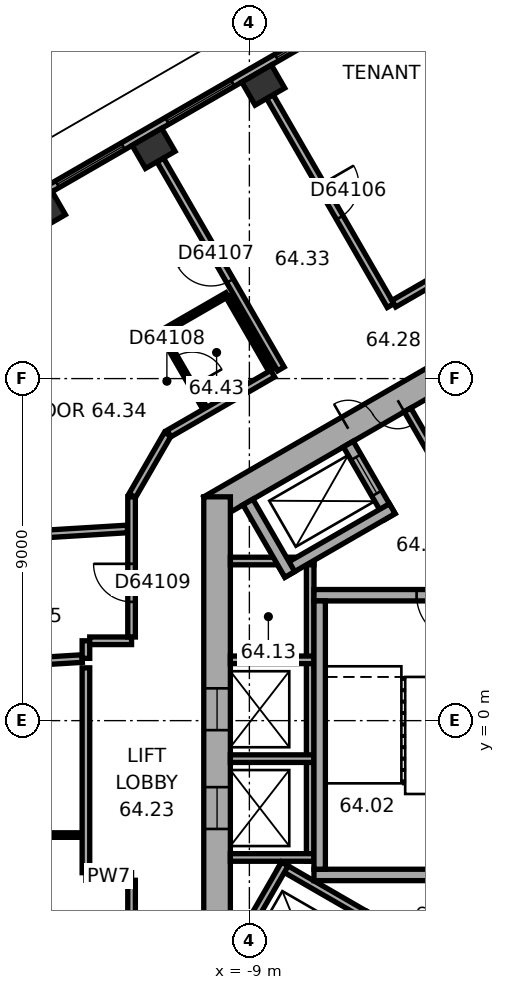
"""IFC4 building model, lengths in metres.
Left out: names, types, materials, properties, quantities, classifications, styles, units other than length and angle.
Written with IfcOpenShell. Run it as: python <this file> out.ifc"""

import sys

from ifc_helpers import new_model, si_unit, direction, frame, frame_2d, origin, origin_2d, place, context, subcontext, project, spatial, rectangle, extrude, element, fill, save


model = new_model("IFC4")
c1 = context("Model", 3, precision=1e-05, world=origin(), true_north=direction((0.0, 1.0)))
c2 = subcontext(c1, "Body", "Model", "MODEL_VIEW")
j1 = project(units=[si_unit("LENGTHUNIT", "METRE"), si_unit("PLANEANGLEUNIT", "RADIAN")], contexts=[c1])
p1 = place(None, origin())
s1 = spatial("IfcSite", under=j1, at=p1, CompositionType="ELEMENT")
p2 = place(p1, origin())
s2 = spatial("IfcBuilding", under=s1, at=p2, CompositionType="ELEMENT")
p3 = place(p2, frame((0.0, 0.0, 259.8)))
s3 = spatial("IfcBuildingStorey", under=s2, at=p3, CompositionType="ELEMENT", Elevation=259.8)
for number, where, z_axis, x_axis in (
    (1, (-8.635, 16.723, 0.0), (0.0, 0.0, 1.0), (-0.866, -0.5, 0.0)),
    (2, (-11.52, 15.057, 0.0), (0.0, 0.0, 1.0), (-0.866, -0.5, 0.0)),
    (3, (-14.406, 13.391, 0.0), (0.0, 0.0, 1.0), (-0.866, -0.5, 0.0)),
):
    element("IfcColumn", number, at=place(p3, frame(where, z_axis=z_axis, x_axis=x_axis)), inside=s3, PredefinedType="COLUMN", context=c2, shape_type="SweptSolid", body=[
        extrude(rectangle(XDim=0.9, YDim=0.7, at=origin_2d()), origin(), (0.0, 0.0, 1.0), 3.7),
    ])
p4 = place(p3, frame((0.175, 11.475, 0.0), z_axis=(0.0, 0.0, 1.0), x_axis=(-0.866026453023, -0.499998182661, 0.0)))
e4 = element("IfcWall", 4, at=p4, inside=s3, PredefinedType="SHEAR", context=c2, shape_type="SweptSolid", body=[
    extrude(rectangle(XDim=11.778, YDim=0.7, at=frame_2d((5.889, 0.0))), origin(), (0.0, 0.0, 1.0), 3.7),
])
p5 = place(p4, frame((6.089, 0.0, 0.0)))
e5 = element("IfcOpeningElement", 5, at=p5, cuts=e4, PredefinedType="OPENING", context=c2, shape_type="SweptSolid", body=[
    extrude(rectangle(XDim=1.5, YDim=2.1, at=frame_2d((0.75, 1.05))), frame((0.0, 0.36, 0.0), z_axis=(0.0, -1.0, 0.0), x_axis=(1.0, 0.0, 0.0)), (0.0, 0.0, 1.0), 0.72),
])
p6 = place(p4, frame((2.939, 0.0, 0.0)))
e6 = element("IfcOpeningElement", 6, at=p6, cuts=e4, PredefinedType="OPENING", context=c2, shape_type="SweptSolid", body=[
    extrude(rectangle(XDim=0.9, YDim=2.1, at=frame_2d((0.45, 1.05))), frame((0.0, 0.36, 0.0), z_axis=(0.0, -1.0, 0.0), x_axis=(1.0, 0.0, 0.0)), (0.0, 0.0, 1.0), 0.72),
])
p7 = place(p3, frame((-9.85, 5.889, 0.0), z_axis=(0.0, 0.0, 1.0), x_axis=(0.0, -1.0, 0.0)))
e7 = element("IfcWall", 7, at=p7, inside=s3, PredefinedType="SHEAR", context=c2, shape_type="SweptSolid", body=[
    extrude(rectangle(XDim=11.778, YDim=0.7, at=frame_2d((5.889, 0.0))), origin(), (0.0, 0.0, 1.0), 3.7),
])
p8 = place(p7, frame((5.039, 0.0, 0.0)))
e8 = element("IfcOpeningElement", 8, at=p8, cuts=e7, PredefinedType="OPENING", context=c2, shape_type="SweptSolid", body=[
    extrude(rectangle(XDim=1.1, YDim=2.1, at=frame_2d((0.55, 1.05))), frame((0.0, 0.36, 0.0), z_axis=(0.0, -1.0, 0.0), x_axis=(1.0, 0.0, 0.0)), (0.0, 0.0, 1.0), 0.72),
])
p9 = place(p7, frame((7.639, 0.0, 0.0)))
e9 = element("IfcOpeningElement", 9, at=p9, cuts=e7, PredefinedType="OPENING", context=c2, shape_type="SweptSolid", body=[
    extrude(rectangle(XDim=1.1, YDim=2.1, at=frame_2d((0.55, 1.05))), frame((0.0, 0.36, 0.0), z_axis=(0.0, -1.0, 0.0), x_axis=(1.0, 0.0, 0.0)), (0.0, 0.0, 1.0), 0.72),
])
p10 = place(p3, frame((-2.624, 20.713, 0.0), z_axis=(0.0, 0.0, 1.0), x_axis=(-0.866026460444, -0.499998169808, 0.0)))
e10 = element("IfcWall", 10, at=p10, inside=s3, PredefinedType="STANDARD", context=c2, shape_type="SweptSolid", body=[
    extrude(rectangle(XDim=17.731, YDim=0.2, at=frame_2d((8.866, 0.0))), origin(), (0.0, 0.0, 1.0), 3.7),
])
p11 = place(p10, frame((1.203, 0.0, 0.9)))
e11 = element("IfcOpeningElement", 11, at=p11, cuts=e10, PredefinedType="OPENING", context=c2, shape_type="SweptSolid", body=[
    extrude(rectangle(XDim=2.0, YDim=2.0, at=frame_2d((1.0, 1.0))), frame((0.0, 0.11, 0.0), z_axis=(0.0, -1.0, 0.0), x_axis=(1.0, 0.0, 0.0)), (0.0, 0.0, 1.0), 0.22),
])
p12 = place(p10, frame((4.535, 0.0, 0.9)))
e12 = element("IfcOpeningElement", 12, at=p12, cuts=e10, PredefinedType="OPENING", context=c2, shape_type="SweptSolid", body=[
    extrude(rectangle(XDim=2.0, YDim=2.0, at=frame_2d((1.0, 1.0))), frame((0.0, 0.11, 0.0), z_axis=(0.0, -1.0, 0.0), x_axis=(1.0, 0.0, 0.0)), (0.0, 0.0, 1.0), 0.22),
])
p13 = place(p10, frame((7.867, 0.0, 0.9)))
e13 = element("IfcOpeningElement", 13, at=p13, cuts=e10, PredefinedType="OPENING", context=c2, shape_type="SweptSolid", body=[
    extrude(rectangle(XDim=2.0, YDim=2.0, at=frame_2d((1.0, 1.0))), frame((0.0, 0.11, 0.0), z_axis=(0.0, -1.0, 0.0), x_axis=(1.0, 0.0, 0.0)), (0.0, 0.0, 1.0), 0.22),
])
p14 = place(p10, frame((11.198, 0.0, 0.9)))
e14 = element("IfcOpeningElement", 14, at=p14, cuts=e10, PredefinedType="OPENING", context=c2, shape_type="SweptSolid", body=[
    extrude(rectangle(XDim=2.0, YDim=2.0, at=frame_2d((1.0, 1.0))), frame((0.0, 0.11, 0.0), z_axis=(0.0, -1.0, 0.0), x_axis=(1.0, 0.0, 0.0)), (0.0, 0.0, 1.0), 0.22),
])
p15 = place(p10, frame((14.53, 0.0, 0.9)))
e15 = element("IfcOpeningElement", 15, at=p15, cuts=e10, PredefinedType="OPENING", context=c2, shape_type="SweptSolid", body=[
    extrude(rectangle(XDim=2.0, YDim=2.0, at=frame_2d((1.0, 1.0))), frame((0.0, 0.11, 0.0), z_axis=(0.0, -1.0, 0.0), x_axis=(1.0, 0.0, 0.0)), (0.0, 0.0, 1.0), 0.22),
])
p16 = place(p3, frame((-3.737, 6.272, 0.0), z_axis=(0.0, 0.0, 1.0), x_axis=(-0.50002983664, 0.866008176907, 0.0)))
e16 = element("IfcWall", 16, at=p16, inside=s3, PredefinedType="PARTITIONING", context=c2, shape_type="SweptSolid", body=[
    extrude(rectangle(XDim=2.2, YDim=0.2, at=frame_2d((1.1, 0.0))), origin(), (0.0, 0.0, 1.0), 3.42),
])
p17 = place(p3, frame((-7.4, 4.3, 0.0), z_axis=(0.0, 0.0, 1.0), x_axis=(0.0, -1.0, 0.0)))
e17 = element("IfcWall", 17, at=p17, inside=s3, PredefinedType="PARTITIONING", context=c2, shape_type="SweptSolid", body=[
    extrude(rectangle(XDim=8.0, YDim=0.2, at=frame_2d((4.0, 0.0))), origin(), (0.0, 0.0, 1.0), 3.42),
])
for number, where, z_axis, x_axis in (
    (18, (-7.3, 4.2, 0.0), (0.0, 0.0, 1.0), (-1.0, 0.0, 0.0)),
    (19, (-7.3, 1.6, 0.0), (0.0, 0.0, 1.0), (-1.0, 0.0, 0.0)),
    (20, (-7.3, -1.0, 0.0), (0.0, 0.0, 1.0), (-1.0, 0.0, 0.0)),
    (21, (-7.3, -3.6, 0.0), (0.0, 0.0, 1.0), (-1.0, 0.0, 0.0)),
):
    element("IfcWall", number, at=place(p3, frame(where, z_axis=z_axis, x_axis=x_axis)), inside=s3, PredefinedType="PARTITIONING", context=c2, shape_type="SweptSolid", body=[
        extrude(rectangle(XDim=2.2, YDim=0.2, at=frame_2d((1.1, 0.0))), origin(), (0.0, 0.0, 1.0), 3.42),
    ])
p18 = place(p3, frame((-8.203, -3.809, 0.0), z_axis=(0.0, 0.0, 1.0), x_axis=(0.866028230842, -0.499995103361, 0.0)))
e22 = element("IfcWall", 22, at=p18, inside=s3, PredefinedType="PARTITIONING", context=c2, shape_type="SweptSolid", body=[
    extrude(rectangle(XDim=5.4, YDim=0.2, at=frame_2d((2.7, 0.0))), origin(), (0.0, 0.0, 1.0), 3.42),
])
p19 = place(p3, frame((-8.067, -3.772, 0.0), z_axis=(0.0, 0.0, 1.0), x_axis=(-0.50002983664, -0.866008176907, 0.0)))
e23 = element("IfcWall", 23, at=p19, inside=s3, PredefinedType="PARTITIONING", context=c2, shape_type="SweptSolid", body=[
    extrude(rectangle(XDim=2.2, YDim=0.2, at=frame_2d((1.1, 0.0))), origin(), (0.0, 0.0, 1.0), 3.42),
])
p20 = place(p3, frame((-2.6, 3.3, 0.0), z_axis=(0.0, 0.0, 1.0), x_axis=(-1.0, 0.0, 0.0)))
e24 = element("IfcWall", 24, at=p20, inside=s3, PredefinedType="SHEAR", context=c2, shape_type="SweptSolid", body=[
    extrude(rectangle(XDim=4.7, YDim=0.3, at=frame_2d((2.35, 0.0))), origin(), (0.0, 0.0, 1.0), 3.42),
])
p21 = place(p20, frame((0.8, 0.0, 0.0)))
e25 = element("IfcOpeningElement", 25, at=p21, cuts=e24, PredefinedType="OPENING", context=c2, shape_type="SweptSolid", body=[
    extrude(rectangle(XDim=1.2, YDim=2.1, at=frame_2d((0.6, 1.05))), frame((0.0, 0.16, 0.0), z_axis=(0.0, -1.0, 0.0), x_axis=(1.0, 0.0, 0.0)), (0.0, 0.0, 1.0), 0.32),
])
p22 = place(p3, frame((-2.6, -4.06, 0.0), z_axis=(0.0, 0.0, 1.0), x_axis=(-1.0, 0.0, 0.0)))
e26 = element("IfcWall", 26, at=p22, inside=s3, PredefinedType="SHEAR", context=c2, shape_type="SweptSolid", body=[
    extrude(rectangle(XDim=4.7, YDim=0.3, at=frame_2d((2.35, 0.0))), origin(), (0.0, 0.0, 1.0), 3.42),
])
p23 = place(p3, frame((-7.15, 3.15, 0.0), z_axis=(0.0, 0.0, 1.0), x_axis=(0.0, -1.0, 0.0)))
e27 = element("IfcWall", 27, at=p23, inside=s3, PredefinedType="SHEAR", context=c2, shape_type="SweptSolid", body=[
    extrude(rectangle(XDim=7.06, YDim=0.3, at=frame_2d((3.53, 0.0))), origin(), (0.0, 0.0, 1.0), 3.42),
])
p24 = place(p3, frame((-5.295, 5.372, 0.0), z_axis=(0.0, 0.0, 1.0), x_axis=(-0.500077893725, 0.86598042715, 0.0)))
e28 = element("IfcWall", 28, at=p24, inside=s3, PredefinedType="SHEAR", context=c2, shape_type="SweptSolid", body=[
    extrude(rectangle(XDim=2.2, YDim=0.3, at=frame_2d((1.1, 0.0))), origin(), (0.0, 0.0, 1.0), 3.42),
])
p25 = place(p24, frame((0.7, 0.0, 0.0)))
e29 = element("IfcOpeningElement", 29, at=p25, cuts=e28, PredefinedType="OPENING", context=c2, shape_type="SweptSolid", body=[
    extrude(rectangle(XDim=1.1, YDim=2.1, at=frame_2d((0.55, 1.05))), frame((0.0, 0.16, 0.0), z_axis=(0.0, -1.0, 0.0), x_axis=(1.0, 0.0, 0.0)), (0.0, 0.0, 1.0), 0.32),
])
p26 = place(p3, frame((-5.24, 5.577, 0.0), z_axis=(0.0, 0.0, 1.0), x_axis=(-0.866014461049, -0.500018952895, 0.0)))
e30 = element("IfcWall", 30, at=p26, inside=s3, PredefinedType="SHEAR", context=c2, shape_type="SweptSolid", body=[
    extrude(rectangle(XDim=3.35, YDim=0.3, at=frame_2d((1.675, 0.0))), origin(), (0.0, 0.0, 1.0), 3.42),
])
p27 = place(p3, frame((-7.937, 3.847, 0.0), z_axis=(0.0, 0.0, 1.0), x_axis=(-0.50002983664, 0.866008176907, 0.0)))
e31 = element("IfcWall", 31, at=p27, inside=s3, PredefinedType="SHEAR", context=c2, shape_type="SweptSolid", body=[
    extrude(rectangle(XDim=2.2, YDim=0.3, at=frame_2d((1.1, 0.0))), origin(), (0.0, 0.0, 1.0), 3.42),
])
p28 = place(p3, frame((-18.768, 4.643, 0.0), z_axis=(0.0, 0.0, 1.0), x_axis=(0.99813496285, 0.0610458511, 0.0)))
e32 = element("IfcWall", 32, at=p28, inside=s3, PredefinedType="PARTITIONING", context=c2, shape_type="SweptSolid", body=[
    extrude(rectangle(XDim=6.571, YDim=0.2, at=frame_2d((3.285, 0.0))), origin(), (0.0, 0.0, 1.0), 3.42),
])
p29 = place(p3, frame((-18.565, 1.317, 0.0), z_axis=(0.0, 0.0, 1.0), x_axis=(0.998136844425, 0.061015078472, 0.0)))
e33 = element("IfcWall", 33, at=p29, inside=s3, PredefinedType="PARTITIONING", context=c2, shape_type="SweptSolid", body=[
    extrude(rectangle(XDim=5.174, YDim=0.2, at=frame_2d((2.587, 0.0))), origin(), (0.0, 0.0, 1.0), 2.87),
])
p30 = place(p3, frame((-13.401, -3.011, 0.0), z_axis=(0.0, 0.0, 1.0), x_axis=(-1.0, 0.0, 0.0)))
e34 = element("IfcWall", 34, at=p30, inside=s3, PredefinedType="PARTITIONING", context=c2, shape_type="SweptSolid", body=[
    extrude(rectangle(XDim=3.84, YDim=0.12, at=frame_2d((1.92, 0.0))), origin(), (0.0, 0.0, 1.0), 3.42),
])
p31 = place(p3, frame((-13.301, -4.101, 0.0), z_axis=(0.0, 0.0, 1.0), x_axis=(1.0, 0.0, 0.0)))
e35 = element("IfcWall", 35, at=p31, inside=s3, PredefinedType="PARTITIONING", context=c2, shape_type="SweptSolid", body=[
    extrude(rectangle(XDim=1.201, YDim=0.2, at=frame_2d((0.601, 0.0))), origin(), (0.0, 0.0, 1.0), 3.42),
])
p32 = place(p3, frame((-13.301, 1.389, 0.0), z_axis=(0.0, 0.0, 1.0), x_axis=(0.0, -1.0, 0.0)))
e36 = element("IfcWall", 36, at=p32, inside=s3, PredefinedType="PARTITIONING", context=c2, shape_type="SweptSolid", body=[
    extrude(rectangle(XDim=5.39, YDim=0.2, at=frame_2d((2.695, 0.0))), origin(), (0.0, 0.0, 1.0), 3.42),
])
p33 = place(p3, frame((-13.301, 2.101, 0.0), z_axis=(0.0, 0.0, 1.0), x_axis=(0.0, -1.0, 0.0)))
e37 = element("IfcWall", 37, at=p33, inside=s3, PredefinedType="PARTITIONING", context=c2, shape_type="SweptSolid", body=[
    extrude(rectangle(XDim=0.462, YDim=0.2, at=frame_2d((0.231, 0.0))), origin(), (0.0, 0.0, 1.0), 3.42),
])
p34 = place(p3, frame((-12.1, -4.201, 0.0), z_axis=(0.0, 0.0, 1.0), x_axis=(0.0, -1.0, 0.0)))
e38 = element("IfcWall", 38, at=p34, inside=s3, PredefinedType="PARTITIONING", context=c2, shape_type="SweptSolid", body=[
    extrude(rectangle(XDim=1.648, YDim=0.2, at=frame_2d((0.824, 0.0))), origin(), (0.0, 0.0, 1.0), 3.42),
])
p35 = place(p3, frame((-12.1, 2.101, 0.0), z_axis=(0.0, 0.0, 1.0), x_axis=(-1.0, 0.0, 0.0)))
e39 = element("IfcWall", 39, at=p35, inside=s3, PredefinedType="PARTITIONING", context=c2, shape_type="SweptSolid", body=[
    extrude(rectangle(XDim=1.101, YDim=0.2, at=frame_2d((0.55, 0.0))), origin(), (0.0, 0.0, 1.0), 3.42),
])
p36 = place(p3, frame((-12.1, 5.889, 0.0), z_axis=(0.0, 0.0, 1.0), x_axis=(0.0, -1.0, 0.0)))
e40 = element("IfcWall", 40, at=p36, inside=s3, PredefinedType="PARTITIONING", context=c2, shape_type="SweptSolid", body=[
    extrude(rectangle(XDim=3.688, YDim=0.2, at=frame_2d((1.844, 0.0))), origin(), (0.0, 0.0, 1.0), 3.42),
])
p37 = place(p36, frame((1.763, 0.0, 0.0)))
e41 = element("IfcOpeningElement", 41, at=p37, cuts=e40, PredefinedType="OPENING", context=c2, shape_type="SweptSolid", body=[
    extrude(rectangle(XDim=1.0, YDim=2.1, at=frame_2d((0.5, 1.05))), frame((0.0, 0.11, 0.0), z_axis=(0.0, -1.0, 0.0), x_axis=(1.0, 0.0, 0.0)), (0.0, 0.0, 1.0), 0.22),
])
p38 = place(p3, frame((-11.345, 14.754, 0.0), z_axis=(0.0, 0.0, 1.0), x_axis=(0.500005339912, -0.866022320763, 0.0)))
e42 = element("IfcWall", 42, at=p38, inside=s3, PredefinedType="PARTITIONING", context=c2, shape_type="SweptSolid", body=[
    extrude(rectangle(XDim=6.35, YDim=0.2, at=frame_2d((3.175, 0.0))), origin(), (0.0, 0.0, 1.0), 3.42),
])
p39 = place(p38, frame((2.675, 0.0, 0.0)))
e43 = element("IfcOpeningElement", 43, at=p39, cuts=e42, PredefinedType="OPENING", context=c2, shape_type="SweptSolid", body=[
    extrude(rectangle(XDim=1.0, YDim=2.1, at=frame_2d((0.5, 1.05))), frame((0.0, 0.11, 0.0), z_axis=(0.0, -1.0, 0.0), x_axis=(1.0, 0.0, 0.0)), (0.0, 0.0, 1.0), 0.22),
])
p40 = place(p3, frame((-11.319, 10.208, 0.0), z_axis=(0.0, 0.0, 1.0), x_axis=(0.866010750942, 0.50002537861, 0.0)))
e44 = element("IfcWall", 44, at=p40, inside=s3, PredefinedType="PARTITIONING", context=c2, shape_type="SweptSolid", body=[
    extrude(rectangle(XDim=2.0, YDim=0.12, at=frame_2d((1.0, 0.0))), origin(), (0.0, 0.0, 1.0), 3.42),
])
p41 = place(p3, frame((-11.15, 7.534, 0.0), z_axis=(0.0, 0.0, 1.0), x_axis=(-0.500063286585, -0.865988862174, 0.0)))
e45 = element("IfcWall", 45, at=p41, inside=s3, PredefinedType="PARTITIONING", context=c2, shape_type="SweptSolid", body=[
    extrude(rectangle(XDim=1.86, YDim=0.2, at=frame_2d((0.93, 0.0))), origin(), (0.0, 0.0, 1.0), 3.42),
])
p42 = place(p3, frame((-10.169, 8.216, 0.0), z_axis=(0.0, 0.0, 1.0), x_axis=(-0.500030632641, 0.866007717299, 0.0)))
e46 = element("IfcWall", 46, at=p42, inside=s3, PredefinedType="PARTITIONING", context=c2, shape_type="SweptSolid", body=[
    extrude(rectangle(XDim=2.24, YDim=0.12, at=frame_2d((1.12, 0.0))), origin(), (0.0, 0.0, 1.0), 3.42),
])
p43 = place(p42, frame((0.67, 0.0, 0.0)))
e47 = element("IfcOpeningElement", 47, at=p43, cuts=e46, PredefinedType="OPENING", context=c2, shape_type="SweptSolid", body=[
    extrude(rectangle(XDim=0.9, YDim=2.1, at=frame_2d((0.45, 1.05))), frame((0.0, 0.07, 0.0), z_axis=(0.0, -1.0, 0.0), x_axis=(1.0, 0.0, 0.0)), (0.0, 0.0, 1.0), 0.14),
])
p44 = place(p3, frame((-9.557, 11.156, 0.0), z_axis=(0.0, 0.0, 1.0), x_axis=(0.49994888933, -0.866054910533, 0.0)))
e48 = element("IfcWall", 48, at=p44, inside=s3, PredefinedType="PARTITIONING", context=c2, shape_type="SweptSolid", body=[
    extrude(rectangle(XDim=2.24, YDim=0.12, at=frame_2d((1.12, 0.0))), origin(), (0.0, 0.0, 1.0), 3.42),
])
p45 = place(p3, frame((-8.46, 16.42, 0.0), z_axis=(0.0, 0.0, 1.0), x_axis=(0.500005339912, -0.866022320763, 0.0)))
e49 = element("IfcWall", 49, at=p45, inside=s3, PredefinedType="PARTITIONING", context=c2, shape_type="SweptSolid", body=[
    extrude(rectangle(XDim=6.35, YDim=0.2, at=frame_2d((3.175, 0.0))), origin(), (0.0, 0.0, 1.0), 2.87),
])
p46 = place(p45, frame((2.675, 0.0, 0.0)))
e50 = element("IfcOpeningElement", 50, at=p46, cuts=e49, PredefinedType="OPENING", context=c2, shape_type="SweptSolid", body=[
    extrude(rectangle(XDim=1.0, YDim=2.1, at=frame_2d((0.5, 1.05))), frame((0.0, 0.11, 0.0), z_axis=(0.0, -1.0, 0.0), x_axis=(1.0, 0.0, 0.0)), (0.0, 0.0, 1.0), 0.22),
])
p47 = place(p3, frame((-8.387, 9.13, 0.0), z_axis=(0.0, 0.0, 1.0), x_axis=(-0.866026878644, -0.499997445459, 0.0)))
e51 = element("IfcWall", 51, at=p47, inside=s3, PredefinedType="PARTITIONING", context=c2, shape_type="SweptSolid", body=[
    extrude(rectangle(XDim=3.151, YDim=0.2, at=frame_2d((1.575, 0.0))), origin(), (0.0, 0.0, 1.0), 3.42),
])
p48 = place(p3, frame((-0.95, 13.423, 0.0), z_axis=(0.0, 0.0, 1.0), x_axis=(-0.86603557629, -0.499982380289, 0.0)))
e52 = element("IfcWall", 52, at=p48, inside=s3, PredefinedType="PARTITIONING", context=c2, shape_type="SweptSolid", body=[
    extrude(rectangle(XDim=4.906, YDim=0.2, at=frame_2d((2.453, 0.0))), origin(), (0.0, 0.0, 1.0), 3.42),
])
p49 = place(p12, origin())
e53 = element("IfcWindow", 53, at=p49, inside=s3, PartitioningType="SINGLE_PANEL", PredefinedType="WINDOW", context=c2, shape_type="SweptSolid", body=[
    extrude(rectangle(XDim=2.0, YDim=2.0, at=frame_2d((1.0, 1.0))), frame((0.0, 0.03, 0.0), z_axis=(0.0, -1.0, 0.0), x_axis=(1.0, 0.0, 0.0)), (0.0, 0.0, 1.0), 0.06),
])
fill(e12, e53)
p50 = place(p13, origin())
e54 = element("IfcWindow", 54, at=p50, inside=s3, PartitioningType="SINGLE_PANEL", PredefinedType="WINDOW", context=c2, shape_type="SweptSolid", body=[
    extrude(rectangle(XDim=2.0, YDim=2.0, at=frame_2d((1.0, 1.0))), frame((0.0, 0.03, 0.0), z_axis=(0.0, -1.0, 0.0), x_axis=(1.0, 0.0, 0.0)), (0.0, 0.0, 1.0), 0.06),
])
fill(e13, e54)
p51 = place(p14, origin())
e55 = element("IfcWindow", 55, at=p51, inside=s3, PartitioningType="SINGLE_PANEL", PredefinedType="WINDOW", context=c2, shape_type="SweptSolid", body=[
    extrude(rectangle(XDim=2.0, YDim=2.0, at=frame_2d((1.0, 1.0))), frame((0.0, 0.03, 0.0), z_axis=(0.0, -1.0, 0.0), x_axis=(1.0, 0.0, 0.0)), (0.0, 0.0, 1.0), 0.06),
])
fill(e14, e55)
p52 = place(p5, origin())
e56 = element("IfcDoor", 56, at=p52, inside=s3, OperationType="DOUBLE_DOOR_SINGLE_SWING", PredefinedType="DOOR", context=c2, shape_type="SweptSolid", body=[
    extrude(rectangle(XDim=1.5, YDim=2.1, at=frame_2d((0.75, 1.05))), frame((0.0, 0.025, 0.0), z_axis=(0.0, -1.0, 0.0), x_axis=(1.0, 0.0, 0.0)), (0.0, 0.0, 1.0), 0.05),
])
fill(e5, e56)
p53 = place(p21, origin())
e57 = element("IfcDoor", 57, at=p53, inside=s3, OperationType="SINGLE_SWING_RIGHT", PredefinedType="DOOR", context=c2, shape_type="SweptSolid", body=[
    extrude(rectangle(XDim=1.2, YDim=2.1, at=frame_2d((0.6, 1.05))), frame((0.0, 0.025, 0.0), z_axis=(0.0, -1.0, 0.0), x_axis=(1.0, 0.0, 0.0)), (0.0, 0.0, 1.0), 0.05),
])
fill(e25, e57)
p54 = place(p25, origin())
e58 = element("IfcDoor", 58, at=p54, inside=s3, OperationType="DOUBLE_DOOR_SLIDING", PredefinedType="DOOR", context=c2, shape_type="SweptSolid", body=[
    extrude(rectangle(XDim=1.1, YDim=2.1, at=frame_2d((0.55, 1.05))), frame((0.0, 0.025, 0.0), z_axis=(0.0, -1.0, 0.0), x_axis=(1.0, 0.0, 0.0)), (0.0, 0.0, 1.0), 0.05),
])
fill(e29, e58)
p55 = place(p8, origin())
e59 = element("IfcDoor", 59, at=p55, inside=s3, OperationType="DOUBLE_DOOR_SLIDING", PredefinedType="DOOR", context=c2, shape_type="SweptSolid", body=[
    extrude(rectangle(XDim=1.1, YDim=2.1, at=frame_2d((0.55, 1.05))), frame((0.0, 0.025, 0.0), z_axis=(0.0, -1.0, 0.0), x_axis=(1.0, 0.0, 0.0)), (0.0, 0.0, 1.0), 0.05),
])
fill(e8, e59)
p56 = place(p9, origin())
e60 = element("IfcDoor", 60, at=p56, inside=s3, OperationType="DOUBLE_DOOR_SLIDING", PredefinedType="DOOR", context=c2, shape_type="SweptSolid", body=[
    extrude(rectangle(XDim=1.1, YDim=2.1, at=frame_2d((0.55, 1.05))), frame((0.0, 0.025, 0.0), z_axis=(0.0, -1.0, 0.0), x_axis=(1.0, 0.0, 0.0)), (0.0, 0.0, 1.0), 0.05),
])
fill(e9, e60)
p57 = place(p46, origin())
e61 = element("IfcDoor", 61, at=p57, inside=s3, OperationType="SINGLE_SWING_LEFT", PredefinedType="DOOR", context=c2, shape_type="SweptSolid", body=[
    extrude(rectangle(XDim=1.0, YDim=2.1, at=frame_2d((0.5, 1.05))), frame((0.0, 0.025, 0.0), z_axis=(0.0, -1.0, 0.0), x_axis=(1.0, 0.0, 0.0)), (0.0, 0.0, 1.0), 0.05),
])
fill(e50, e61)
p58 = place(p39, origin())
e62 = element("IfcDoor", 62, at=p58, inside=s3, OperationType="SINGLE_SWING_LEFT", PredefinedType="DOOR", context=c2, shape_type="SweptSolid", body=[
    extrude(rectangle(XDim=1.0, YDim=2.1, at=frame_2d((0.5, 1.05))), frame((0.0, 0.025, 0.0), z_axis=(0.0, -1.0, 0.0), x_axis=(1.0, 0.0, 0.0)), (0.0, 0.0, 1.0), 0.05),
])
fill(e43, e62)
p59 = place(p43, origin())
e63 = element("IfcDoor", 63, at=p59, inside=s3, OperationType="SINGLE_SWING_LEFT", PredefinedType="DOOR", context=c2, shape_type="SweptSolid", body=[
    extrude(rectangle(XDim=0.9, YDim=2.1, at=frame_2d((0.45, 1.05))), frame((0.0, 0.025, 0.0), z_axis=(0.0, -1.0, 0.0), x_axis=(1.0, 0.0, 0.0)), (0.0, 0.0, 1.0), 0.05),
])
fill(e47, e63)
p60 = place(p37, origin())
e64 = element("IfcDoor", 64, at=p60, inside=s3, OperationType="SINGLE_SWING_LEFT", PredefinedType="DOOR", context=c2, shape_type="SweptSolid", body=[
    extrude(rectangle(XDim=1.0, YDim=2.1, at=frame_2d((0.5, 1.05))), frame((0.0, 0.025, 0.0), z_axis=(0.0, -1.0, 0.0), x_axis=(1.0, 0.0, 0.0)), (0.0, 0.0, 1.0), 0.05),
])
fill(e41, e64)
save(model, sys.argv[1])
